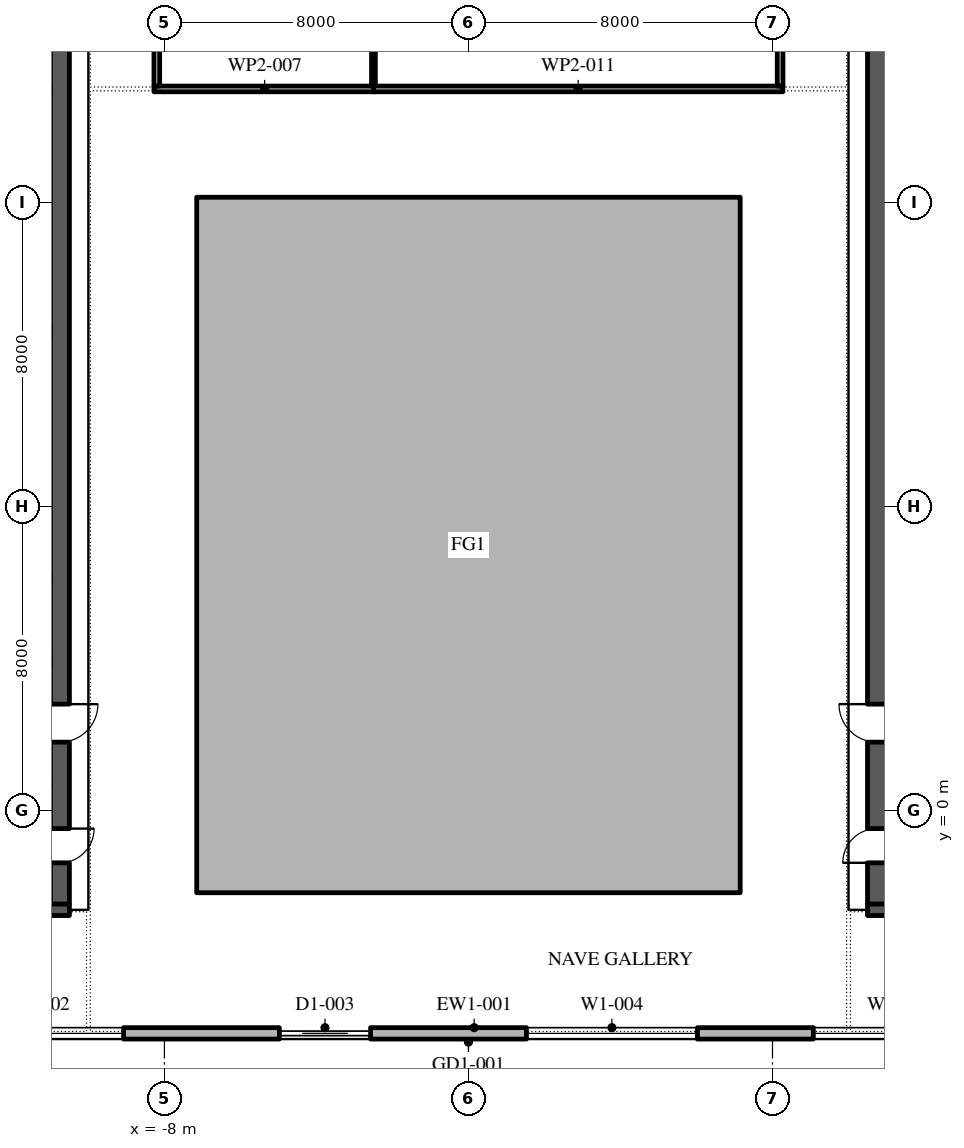
"""IFC4 building model, lengths in metres.
Left out: names, types, materials, properties, quantities, classifications, styles, units other than length and angle.
Written with IfcOpenShell. Run it as: python <this file> out.ifc"""

import sys

from ifc_helpers import new_model, si_unit, direction, frame, frame_2d, origin, place, context, subcontext, project, spatial, polyline, rectangle, outline, extrude, element, fill, save


model = new_model("IFC4")
c1 = context("Model", 3, precision=1e-05, world=origin(), true_north=direction((0.0, 1.0)))
c2 = subcontext(c1, "Body", "Model", "MODEL_VIEW")
j1 = project(units=[si_unit("LENGTHUNIT", "METRE"), si_unit("PLANEANGLEUNIT", "RADIAN")], contexts=[c1])
p1 = place(None, origin())
s1 = spatial("IfcSite", under=j1, at=p1, CompositionType="ELEMENT")
p2 = place(p1, origin())
s2 = spatial("IfcBuilding", under=s1, at=p2, CompositionType="ELEMENT")
p3 = place(p2, frame((0.0, 0.0, 330.0)))
s3 = spatial("IfcBuildingStorey", under=s2, at=p3, CompositionType="ELEMENT", Elevation=330.0)
p4 = place(p3, origin())
e1 = element("IfcWall", 1, at=p4, inside=s3, PredefinedType="STANDARD", context=c2, shape_type="SweptSolid", body=[
    extrude(outline(polyline([(-7.15, -2.15), (7.15, -2.15), (7.15, 16.15), (-7.15, 16.15), (-7.15, -2.15)]), holes=[polyline([(-7.0, -2.0), (-7.0, 16.0), (7.0, 16.0), (7.0, -2.0), (-7.0, -2.0)])]), origin(), (0.0, 0.0, 1.0), 4.0),
])
p5 = place(p3, frame((-22.35, -5.85, 0.0), z_axis=(0.0, 0.0, 1.0), x_axis=(1.0, 0.0, 0.0)))
e2 = element("IfcWall", 2, at=p5, inside=s3, PredefinedType="STANDARD", context=c2, shape_type="SweptSolid", body=[
    extrude(rectangle(XDim=45.0, YDim=0.3, at=frame_2d((22.5, 0.0))), origin(), (0.0, 0.0, 1.0), 4.0),
])
p6 = place(p5, frame((1.375, 0.0, 0.45)))
e3 = element("IfcOpeningElement", 3, at=p6, cuts=e2, PredefinedType="OPENING", context=c2, shape_type="SweptSolid", body=[
    extrude(rectangle(XDim=4.5, YDim=3.05, at=frame_2d((2.25, 1.525))), frame((0.0, 0.16, 0.0), z_axis=(0.0, -1.0, 0.0), x_axis=(1.0, 0.0, 0.0)), (0.0, 0.0, 1.0), 0.32),
])
p7 = place(p5, frame((8.775, 0.0, 0.45)))
e4 = element("IfcOpeningElement", 4, at=p7, cuts=e2, PredefinedType="OPENING", context=c2, shape_type="SweptSolid", body=[
    extrude(rectangle(XDim=4.5, YDim=3.05, at=frame_2d((2.25, 1.525))), frame((0.0, 0.16, 0.0), z_axis=(0.0, -1.0, 0.0), x_axis=(1.0, 0.0, 0.0)), (0.0, 0.0, 1.0), 0.32),
])
p8 = place(p5, frame((17.375, 0.0, 0.0)))
e5 = element("IfcOpeningElement", 5, at=p8, cuts=e2, PredefinedType="OPENING", context=c2, shape_type="SweptSolid", body=[
    extrude(rectangle(XDim=2.4, YDim=3.5, at=frame_2d((1.2, 1.75))), frame((0.0, 0.16, 0.0), z_axis=(0.0, -1.0, 0.0), x_axis=(1.0, 0.0, 0.0)), (0.0, 0.0, 1.0), 0.32),
])
p9 = place(p5, frame((23.875, 0.0, 0.45)))
e6 = element("IfcOpeningElement", 6, at=p9, cuts=e2, PredefinedType="OPENING", context=c2, shape_type="SweptSolid", body=[
    extrude(rectangle(XDim=4.5, YDim=3.05, at=frame_2d((2.25, 1.525))), frame((0.0, 0.16, 0.0), z_axis=(0.0, -1.0, 0.0), x_axis=(1.0, 0.0, 0.0)), (0.0, 0.0, 1.0), 0.32),
])
p10 = place(p5, frame((31.425, 0.0, 0.45)))
e7 = element("IfcOpeningElement", 7, at=p10, cuts=e2, PredefinedType="OPENING", context=c2, shape_type="SweptSolid", body=[
    extrude(rectangle(XDim=4.5, YDim=3.05, at=frame_2d((2.25, 1.525))), frame((0.0, 0.16, 0.0), z_axis=(0.0, -1.0, 0.0), x_axis=(1.0, 0.0, 0.0)), (0.0, 0.0, 1.0), 0.32),
])
p11 = place(p5, frame((38.975, 0.0, 0.45)))
e8 = element("IfcOpeningElement", 8, at=p11, cuts=e2, PredefinedType="OPENING", context=c2, shape_type="SweptSolid", body=[
    extrude(rectangle(XDim=4.5, YDim=3.05, at=frame_2d((2.25, 1.525))), frame((0.0, 0.16, 0.0), z_axis=(0.0, -1.0, 0.0), x_axis=(1.0, 0.0, 0.0)), (0.0, 0.0, 1.0), 0.32),
])
p12 = place(p3, frame((-10.75, -2.45, 0.0), z_axis=(0.0, 0.0, 1.0), x_axis=(0.0, 1.0, 0.0)))
e9 = element("IfcWall", 9, at=p12, inside=s3, PredefinedType="SHEAR", context=c2, shape_type="SweptSolid", body=[
    extrude(rectangle(XDim=27.9, YDim=0.5, at=frame_2d((13.95, 0.0))), origin(), (0.0, 0.0, 1.0), 4.0),
])
p13 = place(p12, frame((23.65, 0.0, 0.0)))
e10 = element("IfcOpeningElement", 10, at=p13, cuts=e9, PredefinedType="OPENING", context=c2, shape_type="SweptSolid", body=[
    extrude(rectangle(XDim=2.4, YDim=2.1, at=frame_2d((1.2, 1.05))), frame((0.0, 0.26, 0.0), z_axis=(0.0, -1.0, 0.0), x_axis=(1.0, 0.0, 0.0)), (0.0, 0.0, 1.0), 0.52),
])
p14 = place(p12, frame((1.087, 0.0, 0.0)))
e11 = element("IfcOpeningElement", 11, at=p14, cuts=e9, PredefinedType="OPENING", context=c2, shape_type="SweptSolid", body=[
    extrude(rectangle(XDim=0.9, YDim=2.1, at=frame_2d((0.45, 1.05))), frame((0.0, 0.26, 0.0), z_axis=(0.0, -1.0, 0.0), x_axis=(1.0, 0.0, 0.0)), (0.0, 0.0, 1.0), 0.52),
])
p15 = place(p12, frame((4.262, 0.0, 0.0)))
e12 = element("IfcOpeningElement", 12, at=p15, cuts=e9, PredefinedType="OPENING", context=c2, shape_type="SweptSolid", body=[
    extrude(rectangle(XDim=1.0, YDim=2.1, at=frame_2d((0.5, 1.05))), frame((0.0, 0.26, 0.0), z_axis=(0.0, -1.0, 0.0), x_axis=(1.0, 0.0, 0.0)), (0.0, 0.0, 1.0), 0.52),
])
p16 = place(p3, frame((-21.5, -2.6, 0.0), z_axis=(0.0, 0.0, 1.0), x_axis=(1.0, 0.0, 0.0)))
e13 = element("IfcWall", 13, at=p16, inside=s3, PredefinedType="SHEAR", context=c2, shape_type="SweptSolid", body=[
    extrude(rectangle(XDim=11.0, YDim=0.3, at=frame_2d((5.5, 0.0))), origin(), (0.0, 0.0, 1.0), 4.0),
])
p17 = place(p3, frame((10.75, -2.45, 0.0), z_axis=(0.0, 0.0, 1.0), x_axis=(0.0, 1.0, 0.0)))
e14 = element("IfcWall", 14, at=p17, inside=s3, PredefinedType="SHEAR", context=c2, shape_type="SweptSolid", body=[
    extrude(rectangle(XDim=27.9, YDim=0.5, at=frame_2d((13.95, 0.0))), origin(), (0.0, 0.0, 1.0), 4.0),
])
p18 = place(p17, frame((23.65, 0.0, 0.0)))
e15 = element("IfcOpeningElement", 15, at=p18, cuts=e14, PredefinedType="OPENING", context=c2, shape_type="SweptSolid", body=[
    extrude(rectangle(XDim=2.4, YDim=2.1, at=frame_2d((1.2, 1.05))), frame((0.0, 0.26, 0.0), z_axis=(0.0, -1.0, 0.0), x_axis=(1.0, 0.0, 0.0)), (0.0, 0.0, 1.0), 0.52),
])
p19 = place(p17, frame((1.087, 0.0, 0.0)))
e16 = element("IfcOpeningElement", 16, at=p19, cuts=e14, PredefinedType="OPENING", context=c2, shape_type="SweptSolid", body=[
    extrude(rectangle(XDim=0.9, YDim=2.1, at=frame_2d((0.45, 1.05))), frame((0.0, 0.26, 0.0), z_axis=(0.0, -1.0, 0.0), x_axis=(1.0, 0.0, 0.0)), (0.0, 0.0, 1.0), 0.52),
])
p20 = place(p17, frame((4.262, 0.0, 0.0)))
e17 = element("IfcOpeningElement", 17, at=p20, cuts=e14, PredefinedType="OPENING", context=c2, shape_type="SweptSolid", body=[
    extrude(rectangle(XDim=1.0, YDim=2.1, at=frame_2d((0.5, 1.05))), frame((0.0, 0.26, 0.0), z_axis=(0.0, -1.0, 0.0), x_axis=(1.0, 0.0, 0.0)), (0.0, 0.0, 1.0), 0.52),
])
p21 = place(p3, frame((10.5, -2.6, 0.0), z_axis=(0.0, 0.0, 1.0), x_axis=(1.0, 0.0, 0.0)))
e18 = element("IfcWall", 18, at=p21, inside=s3, PredefinedType="SHEAR", context=c2, shape_type="SweptSolid", body=[
    extrude(rectangle(XDim=11.0, YDim=0.3, at=frame_2d((5.5, 0.0))), origin(), (0.0, 0.0, 1.0), 4.0),
])
p22 = place(p3, frame((-8.275, 19.0, 0.0), z_axis=(0.0, 0.0, 1.0), x_axis=(1.0, 0.0, 0.0)))
e19 = element("IfcWall", 19, at=p22, inside=s3, PredefinedType="PARTITIONING", context=c2, shape_type="SweptSolid", body=[
    extrude(rectangle(XDim=5.825, YDim=0.15, at=frame_2d((2.913, 0.0))), origin(), (0.0, 0.0, 1.0), 4.0),
])
p23 = place(p3, frame((-8.2, 41.075, 0.0), z_axis=(0.0, 0.0, 1.0), x_axis=(0.0, -1.0, 0.0)))
e20 = element("IfcWall", 20, at=p23, inside=s3, PredefinedType="PARTITIONING", context=c2, shape_type="SweptSolid", body=[
    extrude(rectangle(XDim=22.0, YDim=0.15, at=frame_2d((11.0, 0.0))), origin(), (0.0, 0.0, 1.0), 4.0),
])
p24 = place(p23, frame((10.675, 0.0, 0.0)))
e21 = element("IfcOpeningElement", 21, at=p24, cuts=e20, PredefinedType="OPENING", context=c2, shape_type="SweptSolid", body=[
    extrude(rectangle(XDim=1.0, YDim=2.1, at=frame_2d((0.5, 1.05))), frame((0.0, 0.085, 0.0), z_axis=(0.0, -1.0, 0.0), x_axis=(1.0, 0.0, 0.0)), (0.0, 0.0, 1.0), 0.17),
])
p25 = place(p3, frame((-2.5, 19.075, 0.0), z_axis=(0.0, 0.0, 1.0), x_axis=(0.0, 1.0, 0.0)))
e22 = element("IfcWall", 22, at=p25, inside=s3, PredefinedType="PARTITIONING", context=c2, shape_type="SweptSolid", body=[
    extrude(rectangle(XDim=22.0, YDim=0.1, at=frame_2d((11.0, 0.0))), origin(), (0.0, 0.0, 1.0), 4.0),
])
p26 = place(p3, frame((-2.5, 19.0, 0.0), z_axis=(0.0, 0.0, 1.0), x_axis=(1.0, 0.0, 0.0)))
e23 = element("IfcWall", 23, at=p26, inside=s3, PredefinedType="PARTITIONING", context=c2, shape_type="SweptSolid", body=[
    extrude(rectangle(XDim=10.775, YDim=0.15, at=frame_2d((5.387, 0.0))), origin(), (0.0, 0.0, 1.0), 4.0),
])
p27 = place(p3, frame((8.2, 19.075, 0.0), z_axis=(0.0, 0.0, 1.0), x_axis=(0.0, 1.0, 0.0)))
e24 = element("IfcWall", 24, at=p27, inside=s3, PredefinedType="PARTITIONING", context=c2, shape_type="SweptSolid", body=[
    extrude(rectangle(XDim=22.0, YDim=0.15, at=frame_2d((11.0, 0.0))), origin(), (0.0, 0.0, 1.0), 4.0),
])
p28 = place(p27, frame((7.725, 0.0, 0.0)))
e25 = element("IfcOpeningElement", 25, at=p28, cuts=e24, PredefinedType="OPENING", context=c2, shape_type="SweptSolid", body=[
    extrude(rectangle(XDim=1.8, YDim=2.1, at=frame_2d((0.9, 1.05))), frame((0.0, 0.085, 0.0), z_axis=(0.0, -1.0, 0.0), x_axis=(1.0, 0.0, 0.0)), (0.0, 0.0, 1.0), 0.17),
])
p29 = place(p7, origin())
e26 = element("IfcWindow", 26, at=p29, inside=s3, PartitioningType="DOUBLE_PANEL_VERTICAL", PredefinedType="WINDOW", context=c2, shape_type="SweptSolid", body=[
    extrude(rectangle(XDim=4.5, YDim=3.05, at=frame_2d((2.25, 1.525))), frame((0.0, 0.03, 0.0), z_axis=(0.0, -1.0, 0.0), x_axis=(1.0, 0.0, 0.0)), (0.0, 0.0, 1.0), 0.06),
])
fill(e4, e26)
p30 = place(p8, origin())
e27 = element("IfcDoor", 27, at=p30, inside=s3, OperationType="DOUBLE_DOOR_SLIDING", PredefinedType="DOOR", context=c2, shape_type="SweptSolid", body=[
    extrude(rectangle(XDim=2.4, YDim=3.5, at=frame_2d((1.2, 1.75))), frame((0.0, 0.025, 0.0), z_axis=(0.0, -1.0, 0.0), x_axis=(1.0, 0.0, 0.0)), (0.0, 0.0, 1.0), 0.05),
])
fill(e5, e27)
p31 = place(p9, origin())
e28 = element("IfcWindow", 28, at=p31, inside=s3, PartitioningType="DOUBLE_PANEL_VERTICAL", PredefinedType="WINDOW", context=c2, shape_type="SweptSolid", body=[
    extrude(rectangle(XDim=4.5, YDim=3.05, at=frame_2d((2.25, 1.525))), frame((0.0, 0.03, 0.0), z_axis=(0.0, -1.0, 0.0), x_axis=(1.0, 0.0, 0.0)), (0.0, 0.0, 1.0), 0.06),
])
fill(e6, e28)
p32 = place(p10, origin())
e29 = element("IfcWindow", 29, at=p32, inside=s3, PartitioningType="DOUBLE_PANEL_VERTICAL", PredefinedType="WINDOW", context=c2, shape_type="SweptSolid", body=[
    extrude(rectangle(XDim=4.5, YDim=3.05, at=frame_2d((2.25, 1.525))), frame((0.0, 0.03, 0.0), z_axis=(0.0, -1.0, 0.0), x_axis=(1.0, 0.0, 0.0)), (0.0, 0.0, 1.0), 0.06),
])
fill(e7, e29)
save(model, sys.argv[1])
